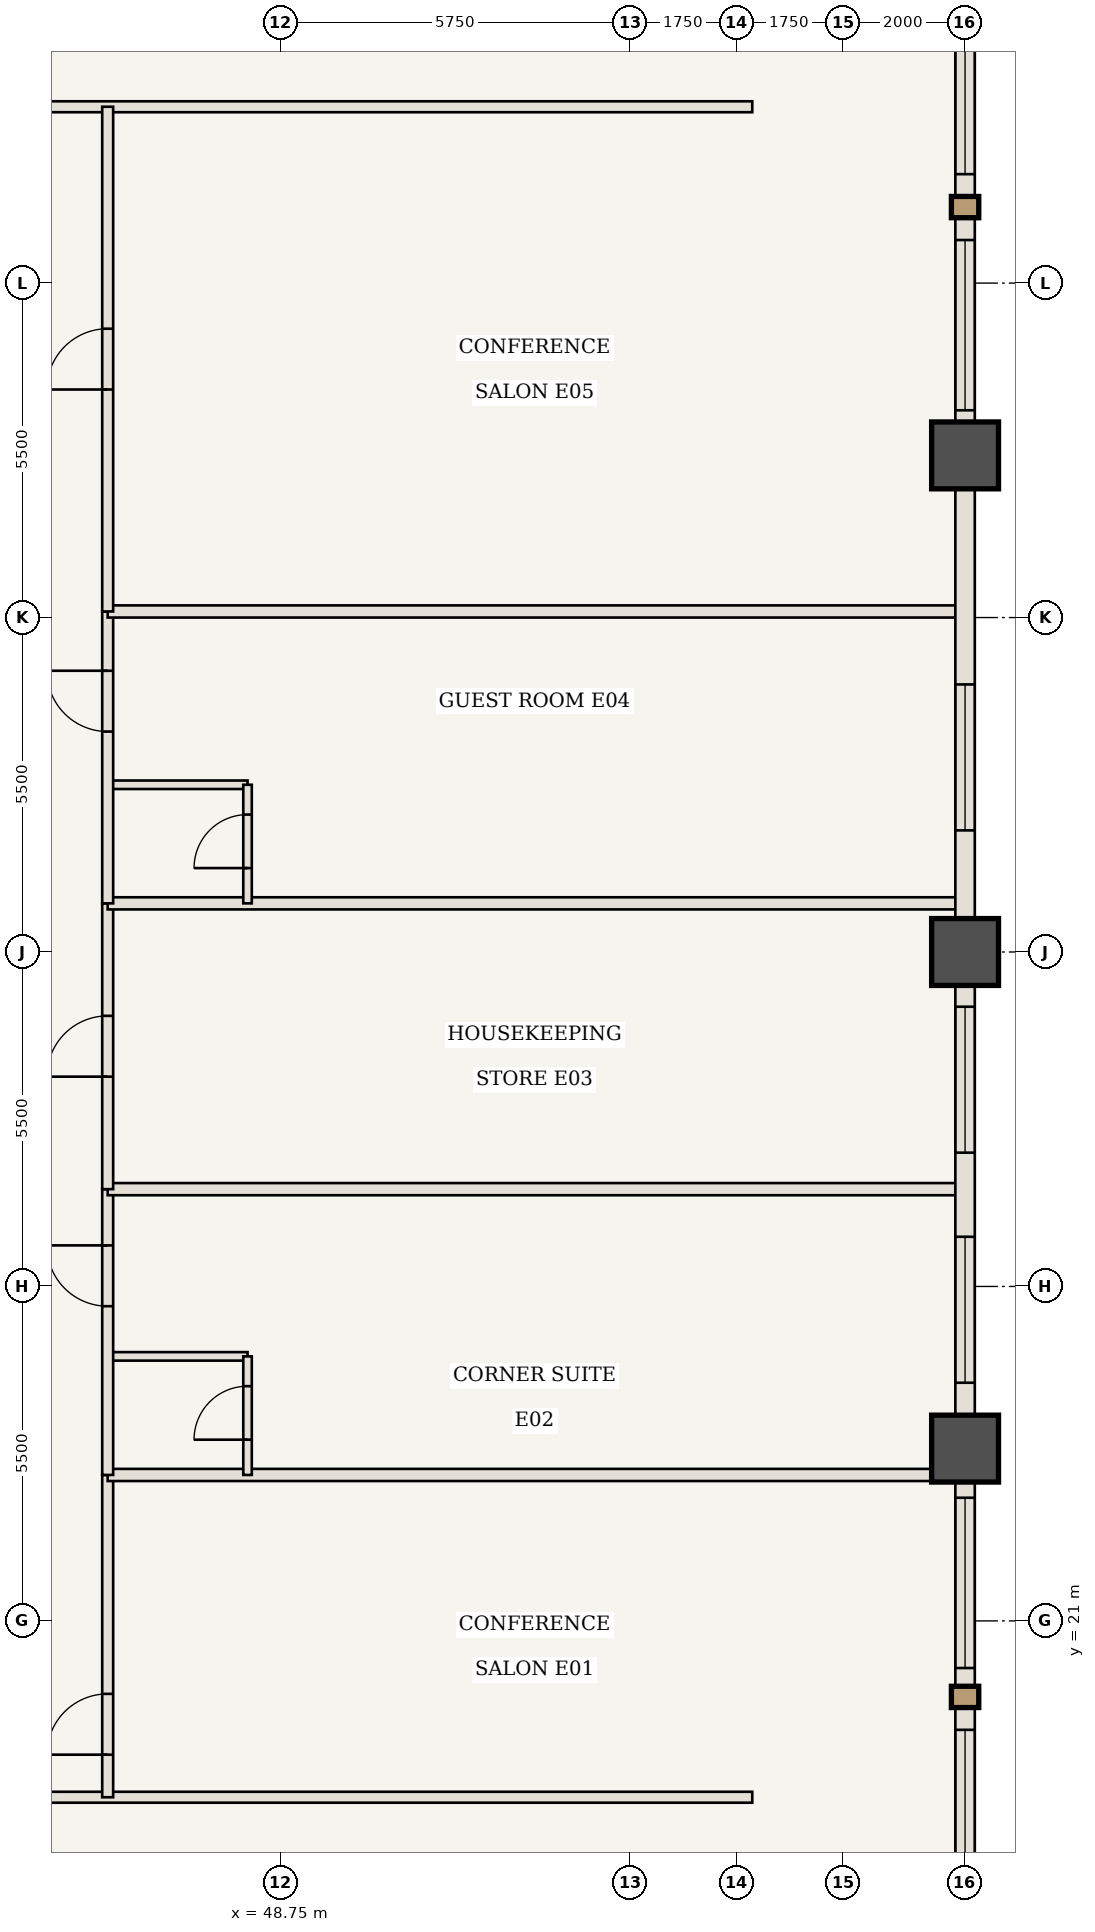
"""IFC4 building model, lengths in metres.
Left out: names, types, materials, properties, quantities, classifications, styles, units other than length and angle.
Written with IfcOpenShell. Run it as: python <this file> out.ifc"""

import sys

from ifc_helpers import new_model, si_unit, direction, frame, frame_2d, origin, origin_2d, place, context, subcontext, project, spatial, rectangle, extrude, element, fill, save


model = new_model("IFC4")
c1 = context("Model", 3, precision=1e-05, world=origin(), true_north=direction((0.0, 1.0)))
c2 = subcontext(c1, "Body", "Model", "MODEL_VIEW")
j1 = project(units=[si_unit("LENGTHUNIT", "METRE"), si_unit("PLANEANGLEUNIT", "RADIAN")], contexts=[c1])
p1 = place(None, origin())
s1 = spatial("IfcSite", under=j1, at=p1, CompositionType="ELEMENT")
p2 = place(p1, origin())
s2 = spatial("IfcBuilding", under=s1, at=p2, CompositionType="ELEMENT")
p3 = place(p2, frame((0.0, 0.0, 49.35)))
s3 = spatial("IfcBuildingStorey", under=s2, at=p3, CompositionType="ELEMENT", Elevation=49.35)
for number, where, z_axis, x_axis in (
    (1, (60.0, 23.833, 0.0), (0.0, 0.0, 1.0), (1.0, 0.0, 0.0)),
    (2, (60.0, 32.0, 0.0), (0.0, 0.0, 1.0), (1.0, 0.0, 0.0)),
    (3, (60.0, 40.167, 0.0), (0.0, 0.0, 1.0), (1.0, 0.0, 0.0)),
):
    element("IfcColumn", number, at=place(p3, frame(where, z_axis=z_axis, x_axis=x_axis)), inside=s3, PredefinedType="COLUMN", context=c2, shape_type="SweptSolid", body=[
        extrude(rectangle(XDim=1.1, YDim=1.1, at=origin_2d()), origin(), (0.0, 0.0, 1.0), 3.5),
    ])
p4 = place(p3, frame((34.5, 18.1, 0.0), z_axis=(0.0, 0.0, 1.0), x_axis=(1.0, 0.0, 0.0)))
e4 = element("IfcWall", 4, at=p4, inside=s3, PredefinedType="STANDARD", context=c2, shape_type="SweptSolid", body=[
    extrude(rectangle(XDim=22.0, YDim=0.18, at=frame_2d((11.0, 0.0))), origin(), (0.0, 0.0, 1.0), 3.32),
])
p5 = place(p4, frame((5.175, 0.0, 0.0)))
e5 = element("IfcOpeningElement", 5, at=p5, cuts=e4, PredefinedType="OPENING", context=c2, shape_type="SweptSolid", body=[
    extrude(rectangle(XDim=1.0, YDim=2.15, at=frame_2d((0.5, 1.075))), frame((0.0, 0.1, 0.0), z_axis=(0.0, -1.0, 0.0), x_axis=(1.0, 0.0, 0.0)), (0.0, 0.0, 1.0), 0.2),
])
p6 = place(p3, frame((38.0, 45.9, 0.0), z_axis=(0.0, 0.0, 1.0), x_axis=(1.0, 0.0, 0.0)))
e6 = element("IfcWall", 6, at=p6, inside=s3, PredefinedType="STANDARD", context=c2, shape_type="SweptSolid", body=[
    extrude(rectangle(XDim=18.5, YDim=0.18, at=frame_2d((9.25, 0.0))), origin(), (0.0, 0.0, 1.0), 3.32),
])
p7 = place(p6, frame((4.875, 0.0, 0.0)))
e7 = element("IfcOpeningElement", 7, at=p7, cuts=e6, PredefinedType="OPENING", context=c2, shape_type="SweptSolid", body=[
    extrude(rectangle(XDim=1.0, YDim=2.15, at=frame_2d((0.5, 1.075))), frame((0.0, 0.1, 0.0), z_axis=(0.0, -1.0, 0.0), x_axis=(1.0, 0.0, 0.0)), (0.0, 0.0, 1.0), 0.2),
])
p8 = place(p3, frame((45.9, 18.1, 0.0), z_axis=(0.0, 0.0, 1.0), x_axis=(0.0, 1.0, 0.0)))
e8 = element("IfcWall", 8, at=p8, inside=s3, PredefinedType="STANDARD", context=c2, shape_type="SweptSolid", body=[
    extrude(rectangle(XDim=5.3, YDim=0.18, at=frame_2d((2.65, 0.0))), origin(), (0.0, 0.0, 1.0), 3.32),
])
p9 = place(p8, frame((0.7, 0.0, 0.0)))
e9 = element("IfcOpeningElement", 9, at=p9, cuts=e8, PredefinedType="OPENING", context=c2, shape_type="SweptSolid", body=[
    extrude(rectangle(XDim=1.0, YDim=2.15, at=frame_2d((0.5, 1.075))), frame((0.0, 0.1, 0.0), z_axis=(0.0, -1.0, 0.0), x_axis=(1.0, 0.0, 0.0)), (0.0, 0.0, 1.0), 0.2),
])
p10 = place(p3, frame((45.9, 23.4, 0.0), z_axis=(0.0, 0.0, 1.0), x_axis=(1.0, 0.0, 0.0)))
e10 = element("IfcWall", 10, at=p10, inside=s3, PredefinedType="STANDARD", context=c2, shape_type="SweptSolid", body=[
    extrude(rectangle(XDim=14.04, YDim=0.2, at=frame_2d((7.02, 0.0))), origin(), (0.0, 0.0, 1.0), 3.32),
])
p11 = place(p3, frame((45.9, 25.35, 0.0), z_axis=(0.0, 0.0, 1.0), x_axis=(1.0, 0.0, 0.0)))
e11 = element("IfcWall", 11, at=p11, inside=s3, PredefinedType="STANDARD", context=c2, shape_type="SweptSolid", body=[
    extrude(rectangle(XDim=2.3, YDim=0.14, at=frame_2d((1.15, 0.0))), origin(), (0.0, 0.0, 1.0), 3.32),
])
p12 = place(p3, frame((48.2, 23.4, 0.0), z_axis=(0.0, 0.0, 1.0), x_axis=(0.0, 1.0, 0.0)))
e12 = element("IfcWall", 12, at=p12, inside=s3, PredefinedType="STANDARD", context=c2, shape_type="SweptSolid", body=[
    extrude(rectangle(XDim=1.95, YDim=0.14, at=frame_2d((0.975, 0.0))), origin(), (0.0, 0.0, 1.0), 3.32),
])
p13 = place(p12, frame((0.58, 0.0, 0.0)))
e13 = element("IfcOpeningElement", 13, at=p13, cuts=e12, PredefinedType="OPENING", context=c2, shape_type="SweptSolid", body=[
    extrude(rectangle(XDim=0.88, YDim=2.1, at=frame_2d((0.44, 1.05))), frame((0.0, 0.08, 0.0), z_axis=(0.0, -1.0, 0.0), x_axis=(1.0, 0.0, 0.0)), (0.0, 0.0, 1.0), 0.16),
])
p14 = place(p3, frame((45.9, 23.4, 0.0), z_axis=(0.0, 0.0, 1.0), x_axis=(0.0, 1.0, 0.0)))
e14 = element("IfcWall", 14, at=p14, inside=s3, PredefinedType="STANDARD", context=c2, shape_type="SweptSolid", body=[
    extrude(rectangle(XDim=4.7, YDim=0.18, at=frame_2d((2.35, 0.0))), origin(), (0.0, 0.0, 1.0), 3.32),
])
p15 = place(p14, frame((2.775, 0.0, 0.0)))
e15 = element("IfcOpeningElement", 15, at=p15, cuts=e14, PredefinedType="OPENING", context=c2, shape_type="SweptSolid", body=[
    extrude(rectangle(XDim=1.0, YDim=2.15, at=frame_2d((0.5, 1.075))), frame((0.0, 0.1, 0.0), z_axis=(0.0, -1.0, 0.0), x_axis=(1.0, 0.0, 0.0)), (0.0, 0.0, 1.0), 0.2),
])
p16 = place(p3, frame((45.9, 28.1, 0.0), z_axis=(0.0, 0.0, 1.0), x_axis=(1.0, 0.0, 0.0)))
e16 = element("IfcWall", 16, at=p16, inside=s3, PredefinedType="STANDARD", context=c2, shape_type="SweptSolid", body=[
    extrude(rectangle(XDim=14.04, YDim=0.2, at=frame_2d((7.02, 0.0))), origin(), (0.0, 0.0, 1.0), 3.32),
])
p17 = place(p3, frame((45.9, 28.1, 0.0), z_axis=(0.0, 0.0, 1.0), x_axis=(0.0, 1.0, 0.0)))
e17 = element("IfcWall", 17, at=p17, inside=s3, PredefinedType="STANDARD", context=c2, shape_type="SweptSolid", body=[
    extrude(rectangle(XDim=4.7, YDim=0.18, at=frame_2d((2.35, 0.0))), origin(), (0.0, 0.0, 1.0), 3.32),
])
p18 = place(p17, frame((1.85, 0.0, 0.0)))
e18 = element("IfcOpeningElement", 18, at=p18, cuts=e17, PredefinedType="OPENING", context=c2, shape_type="SweptSolid", body=[
    extrude(rectangle(XDim=1.0, YDim=2.15, at=frame_2d((0.5, 1.075))), frame((0.0, 0.1, 0.0), z_axis=(0.0, -1.0, 0.0), x_axis=(1.0, 0.0, 0.0)), (0.0, 0.0, 1.0), 0.2),
])
p19 = place(p3, frame((45.9, 32.8, 0.0), z_axis=(0.0, 0.0, 1.0), x_axis=(1.0, 0.0, 0.0)))
e19 = element("IfcWall", 19, at=p19, inside=s3, PredefinedType="STANDARD", context=c2, shape_type="SweptSolid", body=[
    extrude(rectangle(XDim=14.04, YDim=0.2, at=frame_2d((7.02, 0.0))), origin(), (0.0, 0.0, 1.0), 3.32),
])
p20 = place(p3, frame((45.9, 34.75, 0.0), z_axis=(0.0, 0.0, 1.0), x_axis=(1.0, 0.0, 0.0)))
e20 = element("IfcWall", 20, at=p20, inside=s3, PredefinedType="STANDARD", context=c2, shape_type="SweptSolid", body=[
    extrude(rectangle(XDim=2.3, YDim=0.14, at=frame_2d((1.15, 0.0))), origin(), (0.0, 0.0, 1.0), 3.32),
])
p21 = place(p3, frame((48.2, 32.8, 0.0), z_axis=(0.0, 0.0, 1.0), x_axis=(0.0, 1.0, 0.0)))
e21 = element("IfcWall", 21, at=p21, inside=s3, PredefinedType="STANDARD", context=c2, shape_type="SweptSolid", body=[
    extrude(rectangle(XDim=1.95, YDim=0.14, at=frame_2d((0.975, 0.0))), origin(), (0.0, 0.0, 1.0), 3.32),
])
p22 = place(p21, frame((0.58, 0.0, 0.0)))
e22 = element("IfcOpeningElement", 22, at=p22, cuts=e21, PredefinedType="OPENING", context=c2, shape_type="SweptSolid", body=[
    extrude(rectangle(XDim=0.88, YDim=2.1, at=frame_2d((0.44, 1.05))), frame((0.0, 0.08, 0.0), z_axis=(0.0, -1.0, 0.0), x_axis=(1.0, 0.0, 0.0)), (0.0, 0.0, 1.0), 0.16),
])
p23 = place(p3, frame((45.9, 32.8, 0.0), z_axis=(0.0, 0.0, 1.0), x_axis=(0.0, 1.0, 0.0)))
e23 = element("IfcWall", 23, at=p23, inside=s3, PredefinedType="STANDARD", context=c2, shape_type="SweptSolid", body=[
    extrude(rectangle(XDim=4.8, YDim=0.18, at=frame_2d((2.4, 0.0))), origin(), (0.0, 0.0, 1.0), 3.32),
])
p24 = place(p23, frame((2.825, 0.0, 0.0)))
e24 = element("IfcOpeningElement", 24, at=p24, cuts=e23, PredefinedType="OPENING", context=c2, shape_type="SweptSolid", body=[
    extrude(rectangle(XDim=1.0, YDim=2.15, at=frame_2d((0.5, 1.075))), frame((0.0, 0.1, 0.0), z_axis=(0.0, -1.0, 0.0), x_axis=(1.0, 0.0, 0.0)), (0.0, 0.0, 1.0), 0.2),
])
p25 = place(p3, frame((45.9, 37.6, 0.0), z_axis=(0.0, 0.0, 1.0), x_axis=(1.0, 0.0, 0.0)))
e25 = element("IfcWall", 25, at=p25, inside=s3, PredefinedType="STANDARD", context=c2, shape_type="SweptSolid", body=[
    extrude(rectangle(XDim=14.04, YDim=0.2, at=frame_2d((7.02, 0.0))), origin(), (0.0, 0.0, 1.0), 3.32),
])
p26 = place(p3, frame((45.9, 37.6, 0.0), z_axis=(0.0, 0.0, 1.0), x_axis=(0.0, 1.0, 0.0)))
e26 = element("IfcWall", 26, at=p26, inside=s3, PredefinedType="STANDARD", context=c2, shape_type="SweptSolid", body=[
    extrude(rectangle(XDim=8.3, YDim=0.18, at=frame_2d((4.15, 0.0))), origin(), (0.0, 0.0, 1.0), 3.32),
])
p27 = place(p26, frame((3.65, 0.0, 0.0)))
e27 = element("IfcOpeningElement", 27, at=p27, cuts=e26, PredefinedType="OPENING", context=c2, shape_type="SweptSolid", body=[
    extrude(rectangle(XDim=1.0, YDim=2.15, at=frame_2d((0.5, 1.075))), frame((0.0, 0.1, 0.0), z_axis=(0.0, -1.0, 0.0), x_axis=(1.0, 0.0, 0.0)), (0.0, 0.0, 1.0), 0.2),
])
p28 = place(p3, frame((60.0, 23.833, 0.0), z_axis=(0.0, 0.0, 1.0), x_axis=(0.0, -1.0, 0.0)))
e28 = element("IfcWall", 28, at=p28, inside=s3, PredefinedType="USERDEFINED", context=c2, shape_type="SweptSolid", body=[
    extrude(rectangle(XDim=8.167, YDim=0.32, at=frame_2d((4.083, 0.0))), origin(), (0.0, 0.0, 1.0), 2.52),
])
p29 = place(p28, frame((0.808, 0.0, 0.85)))
e29 = element("IfcOpeningElement", 29, at=p29, cuts=e28, PredefinedType="OPENING", context=c2, shape_type="SweptSolid", body=[
    extrude(rectangle(XDim=2.8, YDim=1.47, at=frame_2d((1.4, 0.735))), frame((0.0, 0.17, 0.0), z_axis=(0.0, -1.0, 0.0), x_axis=(1.0, 0.0, 0.0)), (0.0, 0.0, 1.0), 0.34),
])
p30 = place(p28, frame((4.625, 0.0, 0.85)))
e30 = element("IfcOpeningElement", 30, at=p30, cuts=e28, PredefinedType="OPENING", context=c2, shape_type="SweptSolid", body=[
    extrude(rectangle(XDim=2.8, YDim=1.47, at=frame_2d((1.4, 0.735))), frame((0.0, 0.17, 0.0), z_axis=(0.0, -1.0, 0.0), x_axis=(1.0, 0.0, 0.0)), (0.0, 0.0, 1.0), 0.34),
])
p31 = place(p3, frame((60.0, 32.0, 0.0), z_axis=(0.0, 0.0, 1.0), x_axis=(0.0, -1.0, 0.0)))
e31 = element("IfcWall", 31, at=p31, inside=s3, PredefinedType="USERDEFINED", context=c2, shape_type="SweptSolid", body=[
    extrude(rectangle(XDim=8.167, YDim=0.32, at=frame_2d((4.083, 0.0))), origin(), (0.0, 0.0, 1.0), 2.52),
])
p32 = place(p31, frame((0.9, 0.0, 0.85)))
e32 = element("IfcOpeningElement", 32, at=p32, cuts=e31, PredefinedType="OPENING", context=c2, shape_type="SweptSolid", body=[
    extrude(rectangle(XDim=2.4, YDim=1.47, at=frame_2d((1.2, 0.735))), frame((0.0, 0.17, 0.0), z_axis=(0.0, -1.0, 0.0), x_axis=(1.0, 0.0, 0.0)), (0.0, 0.0, 1.0), 0.34),
])
p33 = place(p31, frame((4.683, 0.0, 0.85)))
e33 = element("IfcOpeningElement", 33, at=p33, cuts=e31, PredefinedType="OPENING", context=c2, shape_type="SweptSolid", body=[
    extrude(rectangle(XDim=2.4, YDim=1.47, at=frame_2d((1.2, 0.735))), frame((0.0, 0.17, 0.0), z_axis=(0.0, -1.0, 0.0), x_axis=(1.0, 0.0, 0.0)), (0.0, 0.0, 1.0), 0.34),
])
p34 = place(p3, frame((60.0, 40.167, 0.0), z_axis=(0.0, 0.0, 1.0), x_axis=(0.0, -1.0, 0.0)))
e34 = element("IfcWall", 34, at=p34, inside=s3, PredefinedType="USERDEFINED", context=c2, shape_type="SweptSolid", body=[
    extrude(rectangle(XDim=8.167, YDim=0.32, at=frame_2d((4.083, 0.0))), origin(), (0.0, 0.0, 1.0), 2.52),
])
p35 = place(p34, frame((3.767, 0.0, 0.85)))
e35 = element("IfcOpeningElement", 35, at=p35, cuts=e34, PredefinedType="OPENING", context=c2, shape_type="SweptSolid", body=[
    extrude(rectangle(XDim=2.4, YDim=1.47, at=frame_2d((1.2, 0.735))), frame((0.0, 0.17, 0.0), z_axis=(0.0, -1.0, 0.0), x_axis=(1.0, 0.0, 0.0)), (0.0, 0.0, 1.0), 0.34),
])
p36 = place(p3, frame((60.0, 48.333, 0.0), z_axis=(0.0, 0.0, 1.0), x_axis=(0.0, -1.0, 0.0)))
e36 = element("IfcWall", 36, at=p36, inside=s3, PredefinedType="USERDEFINED", context=c2, shape_type="SweptSolid", body=[
    extrude(rectangle(XDim=8.167, YDim=0.32, at=frame_2d((4.083, 0.0))), origin(), (0.0, 0.0, 1.0), 2.52),
])
p37 = place(p36, frame((0.742, 0.0, 0.85)))
e37 = element("IfcOpeningElement", 37, at=p37, cuts=e36, PredefinedType="OPENING", context=c2, shape_type="SweptSolid", body=[
    extrude(rectangle(XDim=2.8, YDim=1.47, at=frame_2d((1.4, 0.735))), frame((0.0, 0.17, 0.0), z_axis=(0.0, -1.0, 0.0), x_axis=(1.0, 0.0, 0.0)), (0.0, 0.0, 1.0), 0.34),
])
p38 = place(p36, frame((4.625, 0.0, 0.85)))
e38 = element("IfcOpeningElement", 38, at=p38, cuts=e36, PredefinedType="OPENING", context=c2, shape_type="SweptSolid", body=[
    extrude(rectangle(XDim=2.8, YDim=1.47, at=frame_2d((1.4, 0.735))), frame((0.0, 0.17, 0.0), z_axis=(0.0, -1.0, 0.0), x_axis=(1.0, 0.0, 0.0)), (0.0, 0.0, 1.0), 0.34),
])
p39 = place(p9, origin())
e39 = element("IfcDoor", 39, at=p39, inside=s3, OperationType="SINGLE_SWING_LEFT", PredefinedType="DOOR", context=c2, shape_type="SweptSolid", body=[
    extrude(rectangle(XDim=1.0, YDim=2.15, at=frame_2d((0.5, 1.075))), frame((0.0, 0.025, 0.0), z_axis=(0.0, -1.0, 0.0), x_axis=(1.0, 0.0, 0.0)), (0.0, 0.0, 1.0), 0.05),
])
fill(e9, e39)
p40 = place(p13, origin())
e40 = element("IfcDoor", 40, at=p40, inside=s3, OperationType="SINGLE_SWING_LEFT", PredefinedType="DOOR", context=c2, shape_type="SweptSolid", body=[
    extrude(rectangle(XDim=0.88, YDim=2.1, at=frame_2d((0.44, 1.05))), frame((0.0, 0.025, 0.0), z_axis=(0.0, -1.0, 0.0), x_axis=(1.0, 0.0, 0.0)), (0.0, 0.0, 1.0), 0.05),
])
fill(e13, e40)
p41 = place(p15, origin())
e41 = element("IfcDoor", 41, at=p41, inside=s3, OperationType="SINGLE_SWING_RIGHT", PredefinedType="DOOR", context=c2, shape_type="SweptSolid", body=[
    extrude(rectangle(XDim=1.0, YDim=2.15, at=frame_2d((0.5, 1.075))), frame((0.0, 0.025, 0.0), z_axis=(0.0, -1.0, 0.0), x_axis=(1.0, 0.0, 0.0)), (0.0, 0.0, 1.0), 0.05),
])
fill(e15, e41)
p42 = place(p18, origin())
e42 = element("IfcDoor", 42, at=p42, inside=s3, OperationType="SINGLE_SWING_LEFT", PredefinedType="DOOR", context=c2, shape_type="SweptSolid", body=[
    extrude(rectangle(XDim=1.0, YDim=2.15, at=frame_2d((0.5, 1.075))), frame((0.0, 0.025, 0.0), z_axis=(0.0, -1.0, 0.0), x_axis=(1.0, 0.0, 0.0)), (0.0, 0.0, 1.0), 0.05),
])
fill(e18, e42)
p43 = place(p22, origin())
e43 = element("IfcDoor", 43, at=p43, inside=s3, OperationType="SINGLE_SWING_LEFT", PredefinedType="DOOR", context=c2, shape_type="SweptSolid", body=[
    extrude(rectangle(XDim=0.88, YDim=2.1, at=frame_2d((0.44, 1.05))), frame((0.0, 0.025, 0.0), z_axis=(0.0, -1.0, 0.0), x_axis=(1.0, 0.0, 0.0)), (0.0, 0.0, 1.0), 0.05),
])
fill(e22, e43)
p44 = place(p24, origin())
e44 = element("IfcDoor", 44, at=p44, inside=s3, OperationType="SINGLE_SWING_RIGHT", PredefinedType="DOOR", context=c2, shape_type="SweptSolid", body=[
    extrude(rectangle(XDim=1.0, YDim=2.15, at=frame_2d((0.5, 1.075))), frame((0.0, 0.025, 0.0), z_axis=(0.0, -1.0, 0.0), x_axis=(1.0, 0.0, 0.0)), (0.0, 0.0, 1.0), 0.05),
])
fill(e24, e44)
p45 = place(p27, origin())
e45 = element("IfcDoor", 45, at=p45, inside=s3, OperationType="SINGLE_SWING_LEFT", PredefinedType="DOOR", context=c2, shape_type="SweptSolid", body=[
    extrude(rectangle(XDim=1.0, YDim=2.15, at=frame_2d((0.5, 1.075))), frame((0.0, 0.025, 0.0), z_axis=(0.0, -1.0, 0.0), x_axis=(1.0, 0.0, 0.0)), (0.0, 0.0, 1.0), 0.05),
])
fill(e27, e45)
p46 = place(p29, origin())
e46 = element("IfcWindow", 46, at=p46, inside=s3, PartitioningType="SINGLE_PANEL", PredefinedType="WINDOW", context=c2, shape_type="SweptSolid", body=[
    extrude(rectangle(XDim=2.8, YDim=1.47, at=frame_2d((1.4, 0.735))), frame((0.0, 0.03, 0.0), z_axis=(0.0, -1.0, 0.0), x_axis=(1.0, 0.0, 0.0)), (0.0, 0.0, 1.0), 0.06),
])
fill(e29, e46)
p47 = place(p30, origin())
e47 = element("IfcWindow", 47, at=p47, inside=s3, PartitioningType="SINGLE_PANEL", PredefinedType="WINDOW", context=c2, shape_type="SweptSolid", body=[
    extrude(rectangle(XDim=2.8, YDim=1.47, at=frame_2d((1.4, 0.735))), frame((0.0, 0.03, 0.0), z_axis=(0.0, -1.0, 0.0), x_axis=(1.0, 0.0, 0.0)), (0.0, 0.0, 1.0), 0.06),
])
fill(e30, e47)
p48 = place(p32, origin())
e48 = element("IfcWindow", 48, at=p48, inside=s3, PartitioningType="SINGLE_PANEL", PredefinedType="WINDOW", context=c2, shape_type="SweptSolid", body=[
    extrude(rectangle(XDim=2.4, YDim=1.47, at=frame_2d((1.2, 0.735))), frame((0.0, 0.03, 0.0), z_axis=(0.0, -1.0, 0.0), x_axis=(1.0, 0.0, 0.0)), (0.0, 0.0, 1.0), 0.06),
])
fill(e32, e48)
p49 = place(p33, origin())
e49 = element("IfcWindow", 49, at=p49, inside=s3, PartitioningType="SINGLE_PANEL", PredefinedType="WINDOW", context=c2, shape_type="SweptSolid", body=[
    extrude(rectangle(XDim=2.4, YDim=1.47, at=frame_2d((1.2, 0.735))), frame((0.0, 0.03, 0.0), z_axis=(0.0, -1.0, 0.0), x_axis=(1.0, 0.0, 0.0)), (0.0, 0.0, 1.0), 0.06),
])
fill(e33, e49)
p50 = place(p35, origin())
e50 = element("IfcWindow", 50, at=p50, inside=s3, PartitioningType="SINGLE_PANEL", PredefinedType="WINDOW", context=c2, shape_type="SweptSolid", body=[
    extrude(rectangle(XDim=2.4, YDim=1.47, at=frame_2d((1.2, 0.735))), frame((0.0, 0.03, 0.0), z_axis=(0.0, -1.0, 0.0), x_axis=(1.0, 0.0, 0.0)), (0.0, 0.0, 1.0), 0.06),
])
fill(e35, e50)
p51 = place(p37, origin())
e51 = element("IfcWindow", 51, at=p51, inside=s3, PartitioningType="SINGLE_PANEL", PredefinedType="WINDOW", context=c2, shape_type="SweptSolid", body=[
    extrude(rectangle(XDim=2.8, YDim=1.47, at=frame_2d((1.4, 0.735))), frame((0.0, 0.03, 0.0), z_axis=(0.0, -1.0, 0.0), x_axis=(1.0, 0.0, 0.0)), (0.0, 0.0, 1.0), 0.06),
])
fill(e37, e51)
p52 = place(p38, origin())
e52 = element("IfcWindow", 52, at=p52, inside=s3, PartitioningType="SINGLE_PANEL", PredefinedType="WINDOW", context=c2, shape_type="SweptSolid", body=[
    extrude(rectangle(XDim=2.8, YDim=1.47, at=frame_2d((1.4, 0.735))), frame((0.0, 0.03, 0.0), z_axis=(0.0, -1.0, 0.0), x_axis=(1.0, 0.0, 0.0)), (0.0, 0.0, 1.0), 0.06),
])
fill(e38, e52)
save(model, sys.argv[1])
